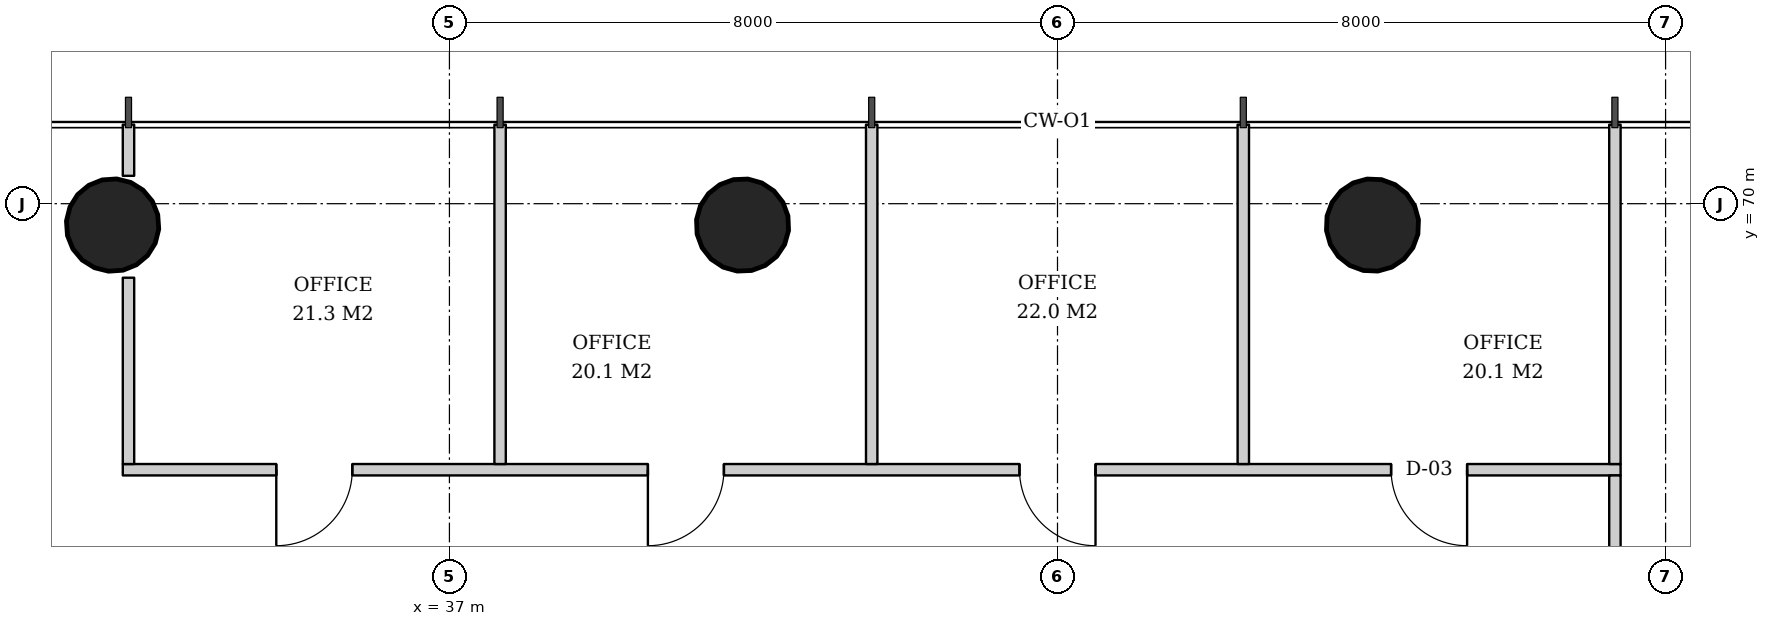
"""IFC4 building model, lengths in metres.
Left out: names, types, materials, properties, quantities, classifications, styles, units other than length and angle.
Written with IfcOpenShell. Run it as: python <this file> out.ifc"""

import sys

from ifc_helpers import new_model, si_unit, direction, frame, frame_2d, origin, origin_2d, place, context, subcontext, project, spatial, rectangle, hollow_circle, extrude, element, fill, save


model = new_model("IFC4")
c1 = context("Model", 3, precision=1e-05, world=origin(), true_north=direction((0.0, 1.0)))
c2 = subcontext(c1, "Body", "Model", "MODEL_VIEW")
j1 = project(units=[si_unit("LENGTHUNIT", "METRE"), si_unit("PLANEANGLEUNIT", "RADIAN")], contexts=[c1])
p1 = place(None, origin())
s1 = spatial("IfcSite", under=j1, at=p1, CompositionType="ELEMENT")
p2 = place(p1, origin())
s2 = spatial("IfcBuilding", under=s1, at=p2, CompositionType="ELEMENT")
p3 = place(p2, frame((0.0, 0.0, 28.6)))
s3 = spatial("IfcBuildingStorey", under=s2, at=p3, CompositionType="ELEMENT", Elevation=28.6)
for number, where, z_axis, x_axis in (
    (1, (49.151, 69.757, 0.0), (-0.006, -0.032, 0.999), (0.981, -0.195, 0.0)),
    (2, (40.849, 69.757, 0.0), (0.006, -0.032, 0.999), (0.981, 0.195, 0.0)),
):
    element("IfcColumn", number, at=place(p3, frame(where, z_axis=z_axis, x_axis=x_axis)), inside=s3, PredefinedType="COLUMN", context=c2, shape_type="SweptSolid", body=[
        extrude(hollow_circle(Radius=0.61, WallThickness=0.04, at=origin_2d()), origin(), (0.0, 0.0, 1.0), 3.802),
    ])
p4 = place(p3, frame((32.546, 69.757, 0.0), z_axis=(0.01919767391, -0.031910514827, 0.9993063436), x_axis=(0.856883815734, 0.515509579284, 0.0)))
e3 = element("IfcColumn", 3, at=p4, inside=s3, PredefinedType="COLUMN", context=c2, shape_type="SweptSolid", body=[
    extrude(hollow_circle(Radius=0.61, WallThickness=0.04, at=origin_2d()), origin(), (0.0, 0.0, 1.0), 3.802),
])
p5 = place(p3, frame((52.408, 66.5, 0.0), z_axis=(0.0, 0.0, 1.0), x_axis=(-1.0, 0.0, 0.0)))
e4 = element("IfcWall", 4, at=p5, inside=s3, PredefinedType="PARTITIONING", context=c2, shape_type="SweptSolid", body=[
    extrude(rectangle(XDim=19.706, YDim=0.15, at=frame_2d((9.853, 0.0))), origin(), (0.0, 0.0, 1.0), 2.806),
])
p6 = place(p5, frame((2.02, 0.0, 0.0)))
e5 = element("IfcOpeningElement", 5, at=p6, cuts=e4, PredefinedType="OPENING", context=c2, shape_type="SweptSolid", body=[
    extrude(rectangle(XDim=1.0, YDim=2.1, at=frame_2d((0.5, 1.05))), frame((0.0, 0.085, 0.0), z_axis=(0.0, -1.0, 0.0), x_axis=(1.0, 0.0, 0.0)), (0.0, 0.0, 1.0), 0.17),
])
p7 = place(p5, frame((6.908, 0.0, 0.0)))
e6 = element("IfcOpeningElement", 6, at=p7, cuts=e4, PredefinedType="OPENING", context=c2, shape_type="SweptSolid", body=[
    extrude(rectangle(XDim=1.0, YDim=2.1, at=frame_2d((0.5, 1.05))), frame((0.0, 0.085, 0.0), z_axis=(0.0, -1.0, 0.0), x_axis=(1.0, 0.0, 0.0)), (0.0, 0.0, 1.0), 0.17),
])
p8 = place(p5, frame((11.797, 0.0, 0.0)))
e7 = element("IfcOpeningElement", 7, at=p8, cuts=e4, PredefinedType="OPENING", context=c2, shape_type="SweptSolid", body=[
    extrude(rectangle(XDim=1.0, YDim=2.1, at=frame_2d((0.5, 1.05))), frame((0.0, 0.085, 0.0), z_axis=(0.0, -1.0, 0.0), x_axis=(1.0, 0.0, 0.0)), (0.0, 0.0, 1.0), 0.17),
])
p9 = place(p5, frame((16.686, 0.0, 0.0)))
e8 = element("IfcOpeningElement", 8, at=p9, cuts=e4, PredefinedType="OPENING", context=c2, shape_type="SweptSolid", body=[
    extrude(rectangle(XDim=1.0, YDim=2.1, at=frame_2d((0.5, 1.05))), frame((0.0, 0.085, 0.0), z_axis=(0.0, -1.0, 0.0), x_axis=(1.0, 0.0, 0.0)), (0.0, 0.0, 1.0), 0.17),
])
for number, where, z_axis, x_axis in (
    (9, (52.333, 66.575, 0.0), (0.0, 0.0, 1.0), (0.0, 1.0, 0.0)),
    (10, (47.444, 66.575, 0.0), (0.0, 0.0, 1.0), (0.0, 1.0, 0.0)),
    (11, (42.556, 66.575, 0.0), (0.0, 0.0, 1.0), (0.0, 1.0, 0.0)),
):
    element("IfcWall", number, at=place(p3, frame(where, z_axis=z_axis, x_axis=x_axis)), inside=s3, PredefinedType="PARTITIONING", context=c2, shape_type="SweptSolid", body=[
        extrude(rectangle(XDim=4.465, YDim=0.15, at=frame_2d((2.232, 0.0))), origin(), (0.0, 0.0, 1.0), 3.02),
    ])
p10 = place(p3, frame((37.667, 66.575, 0.0), z_axis=(0.0, 0.0, 1.0), x_axis=(0.0, 1.0, 0.0)))
e12 = element("IfcWall", 12, at=p10, inside=s3, PredefinedType="PARTITIONING", context=c2, shape_type="SweptSolid", body=[
    extrude(rectangle(XDim=4.465, YDim=0.15, at=frame_2d((2.232, 0.0))), origin(), (0.0, 0.0, 1.0), 2.85),
])
p11 = place(p3, frame((32.778, 66.575, 0.0), z_axis=(0.0, 0.0, 1.0), x_axis=(0.0, 1.0, 0.0)))
e13 = element("IfcWall", 13, at=p11, inside=s3, PredefinedType="PARTITIONING", context=c2, shape_type="SweptSolid", body=[
    extrude(rectangle(XDim=2.451, YDim=0.15, at=frame_2d((1.226, 0.0))), origin(), (0.0, 0.0, 1.0), 3.62),
])
p12 = place(p3, frame((32.778, 70.367, 0.0), z_axis=(0.0, 0.0, 1.0), x_axis=(0.0, 1.0, 0.0)))
e14 = element("IfcWall", 14, at=p12, inside=s3, PredefinedType="PARTITIONING", context=c2, shape_type="SweptSolid", body=[
    extrude(rectangle(XDim=0.673, YDim=0.15, at=frame_2d((0.337, 0.0))), origin(), (0.0, 0.0, 1.0), 3.62),
])
p13 = place(p3, frame((52.333, 62.25, 0.0), z_axis=(0.0, 0.0, 1.0), x_axis=(0.0, 1.0, 0.0)))
e15 = element("IfcWall", 15, at=p13, inside=s3, PredefinedType="PARTITIONING", context=c2, shape_type="SweptSolid", body=[
    extrude(rectangle(XDim=4.175, YDim=0.15, at=frame_2d((2.087, 0.0))), origin(), (0.0, 0.0, 1.0), 3.62),
])
p14 = place(p6, origin())
e16 = element("IfcDoor", 16, at=p14, inside=s3, OperationType="SINGLE_SWING_LEFT", PredefinedType="DOOR", context=c2, shape_type="SweptSolid", body=[
    extrude(rectangle(XDim=1.0, YDim=2.1, at=frame_2d((0.5, 1.05))), frame((0.0, 0.025, 0.0), z_axis=(0.0, -1.0, 0.0), x_axis=(1.0, 0.0, 0.0)), (0.0, 0.0, 1.0), 0.05),
])
fill(e5, e16)
p15 = place(p7, origin())
e17 = element("IfcDoor", 17, at=p15, inside=s3, OperationType="SINGLE_SWING_LEFT", PredefinedType="DOOR", context=c2, shape_type="SweptSolid", body=[
    extrude(rectangle(XDim=1.0, YDim=2.1, at=frame_2d((0.5, 1.05))), frame((0.0, 0.025, 0.0), z_axis=(0.0, -1.0, 0.0), x_axis=(1.0, 0.0, 0.0)), (0.0, 0.0, 1.0), 0.05),
])
fill(e6, e17)
p16 = place(p8, origin())
e18 = element("IfcDoor", 18, at=p16, inside=s3, OperationType="SINGLE_SWING_RIGHT", PredefinedType="DOOR", context=c2, shape_type="SweptSolid", body=[
    extrude(rectangle(XDim=1.0, YDim=2.1, at=frame_2d((0.5, 1.05))), frame((0.0, 0.025, 0.0), z_axis=(0.0, -1.0, 0.0), x_axis=(1.0, 0.0, 0.0)), (0.0, 0.0, 1.0), 0.05),
])
fill(e7, e18)
p17 = place(p9, origin())
e19 = element("IfcDoor", 19, at=p17, inside=s3, OperationType="SINGLE_SWING_RIGHT", PredefinedType="DOOR", context=c2, shape_type="SweptSolid", body=[
    extrude(rectangle(XDim=1.0, YDim=2.1, at=frame_2d((0.5, 1.05))), frame((0.0, 0.025, 0.0), z_axis=(0.0, -1.0, 0.0), x_axis=(1.0, 0.0, 0.0)), (0.0, 0.0, 1.0), 0.05),
])
fill(e8, e19)
save(model, sys.argv[1])
